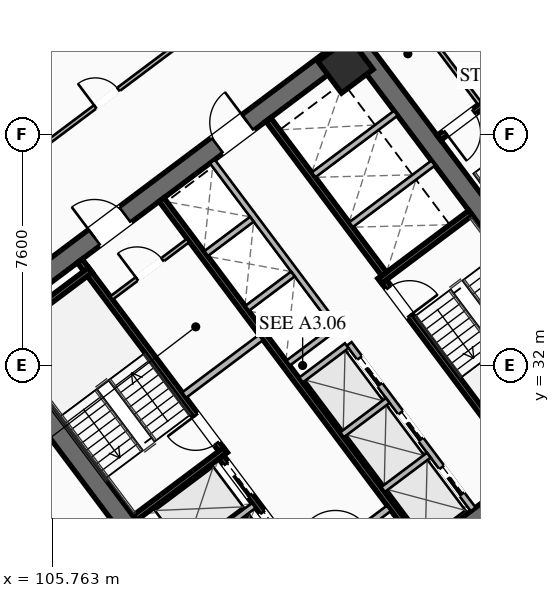
"""IFC4 building model, lengths in metres.
Left out: names, types, materials, properties, quantities, classifications, styles, units other than length and angle.
Written with IfcOpenShell. Run it as: python <this file> out.ifc"""

import sys

from ifc_helpers import new_model, si_unit, direction, frame, frame_2d, origin, origin_2d, place, context, subcontext, project, spatial, rectangle, hollow_rectangle, extrude, element, fill, save


model = new_model("IFC4")
c1 = context("Model", 3, precision=1e-05, world=origin(), true_north=direction((0.0, 1.0)))
c2 = subcontext(c1, "Body", "Model", "MODEL_VIEW")
j1 = project(units=[si_unit("LENGTHUNIT", "METRE"), si_unit("PLANEANGLEUNIT", "RADIAN")], contexts=[c1])
p1 = place(None, origin())
s1 = spatial("IfcSite", under=j1, at=p1, CompositionType="ELEMENT")
p2 = place(p1, origin())
s2 = spatial("IfcBuilding", under=s1, at=p2, CompositionType="ELEMENT")
p3 = place(p2, frame((0.0, 0.0, 35.25)))
s3 = spatial("IfcBuildingStorey", under=s2, at=p3, CompositionType="ELEMENT", Elevation=35.25)
for number, where, z_axis, x_axis in (
    (1, (112.476, 21.107, 0.0), (0.0, 0.0, 1.0), (-0.6, 0.8, 0.0)),
    (2, (115.524, 42.893, 0.0), (0.0, 0.0, 1.0), (0.6, -0.8, 0.0)),
):
    element("IfcWall", number, at=place(p3, frame(where, z_axis=z_axis, x_axis=x_axis)), inside=s3, PredefinedType="SHEAR", context=c2, shape_type="SweptSolid", body=[
        extrude(rectangle(XDim=15.6, YDim=0.65, at=frame_2d((7.8, 0.0))), origin(), (0.0, 0.0, 1.0), 3.55),
    ])
p4 = place(p3, frame((124.429, 30.478, 0.0), z_axis=(0.0, 0.0, 1.0), x_axis=(-0.799998028465, -0.600002628705, 0.0)))
e3 = element("IfcWall", 3, at=p4, inside=s3, PredefinedType="SHEAR", context=c2, shape_type="SweptSolid", body=[
    extrude(rectangle(XDim=14.86, YDim=0.65, at=frame_2d((7.43, 0.0))), origin(), (0.0, 0.0, 1.0), 3.55),
])
p5 = place(p4, frame((9.13, 0.0, 0.0)))
e4 = element("IfcOpeningElement", 4, at=p5, cuts=e3, PredefinedType="OPENING", context=c2, shape_type="SweptSolid", body=[
    extrude(rectangle(XDim=1.25, YDim=2.25, at=frame_2d((0.625, 1.125))), frame((0.0, 0.335, 0.0), z_axis=(0.0, -1.0, 0.0), x_axis=(1.0, 0.0, 0.0)), (0.0, 0.0, 1.0), 0.67),
])
p6 = place(p4, frame((4.08, 0.0, 0.0)))
e5 = element("IfcOpeningElement", 5, at=p6, cuts=e3, PredefinedType="OPENING", context=c2, shape_type="SweptSolid", body=[
    extrude(rectangle(XDim=1.25, YDim=2.25, at=frame_2d((0.625, 1.125))), frame((0.0, 0.335, 0.0), z_axis=(0.0, -1.0, 0.0), x_axis=(1.0, 0.0, 0.0)), (0.0, 0.0, 1.0), 0.67),
])
p7 = place(p3, frame((103.571, 33.522, 0.0), z_axis=(0.0, 0.0, 1.0), x_axis=(0.799998028465, 0.600002628705, 0.0)))
e6 = element("IfcWall", 6, at=p7, inside=s3, PredefinedType="SHEAR", context=c2, shape_type="SweptSolid", body=[
    extrude(rectangle(XDim=14.86, YDim=0.65, at=frame_2d((7.43, 0.0))), origin(), (0.0, 0.0, 1.0), 3.55),
])
p8 = place(p7, frame((4.48, 0.0, 0.0)))
e7 = element("IfcOpeningElement", 7, at=p8, cuts=e6, PredefinedType="OPENING", context=c2, shape_type="SweptSolid", body=[
    extrude(rectangle(XDim=1.25, YDim=2.25, at=frame_2d((0.625, 1.125))), frame((0.0, 0.335, 0.0), z_axis=(0.0, -1.0, 0.0), x_axis=(1.0, 0.0, 0.0)), (0.0, 0.0, 1.0), 0.67),
])
p9 = place(p7, frame((9.53, 0.0, 0.0)))
e8 = element("IfcOpeningElement", 8, at=p9, cuts=e6, PredefinedType="OPENING", context=c2, shape_type="SweptSolid", body=[
    extrude(rectangle(XDim=1.25, YDim=2.25, at=frame_2d((0.625, 1.125))), frame((0.0, 0.335, 0.0), z_axis=(0.0, -1.0, 0.0), x_axis=(1.0, 0.0, 0.0)), (0.0, 0.0, 1.0), 0.67),
])
p10 = place(p3, frame((115.41, 41.87, 0.0), z_axis=(0.0, 0.0, 1.0), x_axis=(0.799999996291, 0.600000004945, 0.0)))
e9 = element("IfcColumn", 9, at=p10, inside=s3, PredefinedType="COLUMN", context=c2, shape_type="SweptSolid", body=[
    extrude(hollow_rectangle(XDim=1.3, YDim=1.3, WallThickness=0.05, at=origin_2d()), origin(), (0.0, 0.0, 1.0), 3.35),
])
p11 = place(p3, frame((111.44, 29.08, 0.0), z_axis=(0.0, 0.0, 1.0), x_axis=(-0.600009827119, 0.799992629566, 0.0)))
e10 = element("IfcWall", 10, at=p11, inside=s3, PredefinedType="SHEAR", context=c2, shape_type="SweptSolid", body=[
    extrude(rectangle(XDim=7.95, YDim=0.2, at=frame_2d((3.975, 0.0))), origin(), (0.0, 0.0, 1.0), 3.35),
])
p12 = place(p11, frame((0.45, 0.0, 0.0)))
e11 = element("IfcOpeningElement", 11, at=p12, cuts=e10, PredefinedType="OPENING", context=c2, shape_type="SweptSolid", body=[
    extrude(rectangle(XDim=1.15, YDim=2.2, at=frame_2d((0.575, 1.1))), frame((0.0, 0.11, 0.0), z_axis=(0.0, -1.0, 0.0), x_axis=(1.0, 0.0, 0.0)), (0.0, 0.0, 1.0), 0.22),
])
for number, where, z_axis, x_axis in (
    (12, (108.476, 26.982, 0.0), (0.0, 0.0, 1.0), (0.8, 0.6, 0.0)),
    (13, (104.036, 32.902, 0.0), (0.0, 0.0, 1.0), (0.8, 0.6, 0.0)),
):
    element("IfcWall", number, at=place(p3, frame(where, z_axis=z_axis, x_axis=x_axis)), inside=s3, PredefinedType="SHEAR", context=c2, shape_type="SweptSolid", body=[
        extrude(rectangle(XDim=3.73, YDim=0.2, at=frame_2d((1.865, 0.0))), origin(), (0.0, 0.0, 1.0), 3.35),
    ])
p13 = place(p3, frame((116.56, 34.92, 0.0), z_axis=(0.0, 0.0, 1.0), x_axis=(0.600009827119, -0.799992629566, 0.0)))
e14 = element("IfcWall", 14, at=p13, inside=s3, PredefinedType="SHEAR", context=c2, shape_type="SweptSolid", body=[
    extrude(rectangle(XDim=7.95, YDim=0.2, at=frame_2d((3.975, 0.0))), origin(), (0.0, 0.0, 1.0), 3.35),
])
p14 = place(p13, frame((0.45, 0.0, 0.0)))
e15 = element("IfcOpeningElement", 15, at=p14, cuts=e14, PredefinedType="OPENING", context=c2, shape_type="SweptSolid", body=[
    extrude(rectangle(XDim=1.15, YDim=2.2, at=frame_2d((0.575, 1.1))), frame((0.0, 0.11, 0.0), z_axis=(0.0, -1.0, 0.0), x_axis=(1.0, 0.0, 0.0)), (0.0, 0.0, 1.0), 0.22),
])
p15 = place(p3, frame((116.54, 34.78, 0.0), z_axis=(0.0, 0.0, 1.0), x_axis=(0.799984290658, 0.600020945218, 0.0)))
e16 = element("IfcWall", 16, at=p15, inside=s3, PredefinedType="SHEAR", context=c2, shape_type="SweptSolid", body=[
    extrude(rectangle(XDim=3.73, YDim=0.2, at=frame_2d((1.865, 0.0))), origin(), (0.0, 0.0, 1.0), 3.35),
])
p16 = place(p3, frame((117.938, 26.016, 0.0), z_axis=(0.0, 0.0, 1.0), x_axis=(-0.600005463273, 0.799995902516, 0.0)))
e17 = element("IfcWall", 17, at=p16, inside=s3, PredefinedType="SHEAR", context=c2, shape_type="SweptSolid", body=[
    extrude(rectangle(XDim=14.3, YDim=0.2, at=frame_2d((7.15, 0.0))), origin(), (0.0, 0.0, 1.0), 3.35),
])
p17 = place(p3, frame((110.104, 31.028, 0.0), z_axis=(0.0, 0.0, 1.0), x_axis=(0.800018601094, 0.59997519774, 0.0)))
e18 = element("IfcWall", 18, at=p17, inside=s3, PredefinedType="SOLIDWALL", context=c2, shape_type="SweptSolid", body=[
    extrude(rectangle(XDim=3.15, YDim=0.22, at=frame_2d((1.575, 0.0))), origin(), (0.0, 0.0, 1.0), 2.703),
])
p18 = place(p3, frame((114.316, 25.412, 0.0), z_axis=(0.0, 0.0, 1.0), x_axis=(0.800018601094, 0.59997519774, 0.0)))
e19 = element("IfcWall", 19, at=p18, inside=s3, PredefinedType="SOLIDWALL", context=c2, shape_type="SweptSolid", body=[
    extrude(rectangle(XDim=3.15, YDim=0.22, at=frame_2d((1.575, 0.0))), origin(), (0.0, 0.0, 1.0), 2.703),
])
p19 = place(p18, frame((0.95, 0.0, 0.0)))
e20 = element("IfcOpeningElement", 20, at=p19, cuts=e19, PredefinedType="OPENING", context=c2, shape_type="SweptSolid", body=[
    extrude(rectangle(XDim=1.25, YDim=2.25, at=frame_2d((0.625, 1.125))), frame((0.0, 0.12, 0.0), z_axis=(0.0, -1.0, 0.0), x_axis=(1.0, 0.0, 0.0)), (0.0, 0.0, 1.0), 0.24),
])
p20 = place(p3, frame((115.13, 23.91, 0.0), z_axis=(0.0, 0.0, 1.0), x_axis=(-0.599975393228, 0.800018454488, 0.0)))
e21 = element("IfcWall", 21, at=p20, inside=s3, PredefinedType="SHEAR", context=c2, shape_type="SweptSolid", body=[
    extrude(rectangle(XDim=6.35, YDim=0.2, at=frame_2d((3.175, 0.0))), origin(), (0.0, 0.0, 1.0), 3.35),
])
p21 = place(p20, frame((4.775, 0.0, 0.0)))
e22 = element("IfcOpeningElement", 22, at=p21, cuts=e21, PredefinedType="OPENING", context=c2, shape_type="SweptSolid", body=[
    extrude(rectangle(XDim=1.3, YDim=2.25, at=frame_2d((0.65, 1.125))), frame((0.0, 0.11, 0.0), z_axis=(0.0, -1.0, 0.0), x_axis=(1.0, 0.0, 0.0)), (0.0, 0.0, 1.0), 0.22),
])
p22 = place(p20, frame((2.775, 0.0, 0.0)))
e23 = element("IfcOpeningElement", 23, at=p22, cuts=e21, PredefinedType="OPENING", context=c2, shape_type="SweptSolid", body=[
    extrude(rectangle(XDim=1.3, YDim=2.25, at=frame_2d((0.65, 1.125))), frame((0.0, 0.11, 0.0), z_axis=(0.0, -1.0, 0.0), x_axis=(1.0, 0.0, 0.0)), (0.0, 0.0, 1.0), 0.22),
])
p23 = place(p20, frame((0.575, 0.0, 0.0)))
e24 = element("IfcOpeningElement", 24, at=p23, cuts=e21, PredefinedType="OPENING", context=c2, shape_type="SweptSolid", body=[
    extrude(rectangle(XDim=1.3, YDim=2.25, at=frame_2d((0.65, 1.125))), frame((0.0, 0.11, 0.0), z_axis=(0.0, -1.0, 0.0), x_axis=(1.0, 0.0, 0.0)), (0.0, 0.0, 1.0), 0.22),
])
p24 = place(p3, frame((109.688, 25.366, 0.0), z_axis=(0.0, 0.0, 1.0), x_axis=(0.8, 0.6, 0.0)))
e25 = element("IfcWall", 25, at=p24, inside=s3, PredefinedType="SOLIDWALL", context=c2, shape_type="SweptSolid", body=[
    extrude(rectangle(XDim=3.38, YDim=0.2, at=frame_2d((1.69, 0.0))), origin(), (0.0, 0.0, 1.0), 3.35),
])
p25 = place(p3, frame((112.87, 40.09, 0.0), z_axis=(0.0, 0.0, 1.0), x_axis=(0.599975393228, -0.800018454488, 0.0)))
e26 = element("IfcWall", 26, at=p25, inside=s3, PredefinedType="SHEAR", context=c2, shape_type="SweptSolid", body=[
    extrude(rectangle(XDim=6.35, YDim=0.2, at=frame_2d((3.175, 0.0))), origin(), (0.0, 0.0, 1.0), 3.35),
])
for number, where, z_axis, x_axis in (
    (27, (115.59, 36.63, 0.0), (0.0, 0.0, 1.0), (0.8, 0.6, 0.0)),
    (28, (114.36, 38.27, 0.0), (0.0, 0.0, 1.0), (0.8, 0.6, 0.0)),
):
    element("IfcWall", number, at=place(p3, frame(where, z_axis=z_axis, x_axis=x_axis)), inside=s3, PredefinedType="SOLIDWALL", context=c2, shape_type="SweptSolid", body=[
        extrude(rectangle(XDim=3.38, YDim=0.2, at=frame_2d((1.69, 0.0))), origin(), (0.0, 0.0, 1.0), 3.35),
    ])
p26 = place(p3, frame((107.71, 34.22, 0.0), z_axis=(0.0, 0.0, 1.0), x_axis=(0.799981399002, 0.60002480053, 0.0)))
e29 = element("IfcWall", 29, at=p26, inside=s3, PredefinedType="PARTITIONING", context=c2, shape_type="SweptSolid", body=[
    extrude(rectangle(XDim=3.15, YDim=0.135, at=frame_2d((1.575, 0.0))), origin(), (0.0, 0.0, 1.0), 2.703),
])
p27 = place(p26, frame((1.05, 0.0, 0.0)))
e30 = element("IfcOpeningElement", 30, at=p27, cuts=e29, PredefinedType="OPENING", context=c2, shape_type="SweptSolid", body=[
    extrude(rectangle(XDim=1.05, YDim=2.2, at=frame_2d((0.525, 1.1))), frame((0.0, 0.077, 0.0), z_axis=(0.0, -1.0, 0.0), x_axis=(1.0, 0.0, 0.0)), (0.0, 0.0, 1.0), 0.155),
])
p28 = place(p3, frame((119.61, 27.27, 0.0), z_axis=(0.0, 0.0, 1.0), x_axis=(-0.600011488909, 0.79999138319, 0.0)))
e31 = element("IfcWall", 31, at=p28, inside=s3, PredefinedType="SOLIDWALL", context=c2, shape_type="SweptSolid", body=[
    extrude(rectangle(XDim=6.8, YDim=0.2, at=frame_2d((3.4, 0.0))), origin(), (0.0, 0.0, 1.0), 3.35),
])
p29 = place(p28, frame((0.625, 0.0, 0.0)))
e32 = element("IfcOpeningElement", 32, at=p29, cuts=e31, PredefinedType="OPENING", context=c2, shape_type="SweptSolid", body=[
    extrude(rectangle(XDim=1.1, YDim=2.2, at=frame_2d((0.55, 1.1))), frame((0.0, 0.11, 0.0), z_axis=(0.0, -1.0, 0.0), x_axis=(1.0, 0.0, 0.0)), (0.0, 0.0, 1.0), 0.22),
])
p30 = place(p28, frame((2.875, 0.0, 0.0)))
e33 = element("IfcOpeningElement", 33, at=p30, cuts=e31, PredefinedType="OPENING", context=c2, shape_type="SweptSolid", body=[
    extrude(rectangle(XDim=1.1, YDim=2.2, at=frame_2d((0.55, 1.1))), frame((0.0, 0.11, 0.0), z_axis=(0.0, -1.0, 0.0), x_axis=(1.0, 0.0, 0.0)), (0.0, 0.0, 1.0), 0.22),
])
p31 = place(p28, frame((5.125, 0.0, 0.0)))
e34 = element("IfcOpeningElement", 34, at=p31, cuts=e31, PredefinedType="OPENING", context=c2, shape_type="SweptSolid", body=[
    extrude(rectangle(XDim=1.1, YDim=2.2, at=frame_2d((0.55, 1.1))), frame((0.0, 0.11, 0.0), z_axis=(0.0, -1.0, 0.0), x_axis=(1.0, 0.0, 0.0)), (0.0, 0.0, 1.0), 0.22),
])
p32 = place(p3, frame((116.646, 27.922, 0.0), z_axis=(0.0, 0.0, 1.0), x_axis=(0.8, 0.6, 0.0)))
e35 = element("IfcWall", 35, at=p32, inside=s3, PredefinedType="SOLIDWALL", context=c2, shape_type="SweptSolid", body=[
    extrude(rectangle(XDim=1.88, YDim=0.2, at=frame_2d((0.94, 0.0))), origin(), (0.0, 0.0, 1.0), 3.35),
])
p33 = place(p3, frame((115.296, 29.722, 0.0), z_axis=(0.0, 0.0, 1.0), x_axis=(0.799984418148, 0.600020775241, 0.0)))
e36 = element("IfcWall", 36, at=p33, inside=s3, PredefinedType="SOLIDWALL", context=c2, shape_type="SweptSolid", body=[
    extrude(rectangle(XDim=1.88, YDim=0.2, at=frame_2d((0.94, 0.0))), origin(), (0.0, 0.0, 1.0), 3.35),
])
p34 = place(p3, frame((113.946, 31.522, 0.0), z_axis=(0.0, 0.0, 1.0), x_axis=(0.8, 0.6, 0.0)))
e37 = element("IfcWall", 37, at=p34, inside=s3, PredefinedType="SOLIDWALL", context=c2, shape_type="SweptSolid", body=[
    extrude(rectangle(XDim=1.88, YDim=0.2, at=frame_2d((0.94, 0.0))), origin(), (0.0, 0.0, 1.0), 3.35),
])
p35 = place(p3, frame((115.11, 33.27, 0.0), z_axis=(0.0, 0.0, 1.0), x_axis=(-0.600011488909, 0.79999138319, 0.0)))
e38 = element("IfcWall", 38, at=p35, inside=s3, PredefinedType="SOLIDWALL", context=c2, shape_type="SweptSolid", body=[
    extrude(rectangle(XDim=6.8, YDim=0.2, at=frame_2d((3.4, 0.0))), origin(), (0.0, 0.0, 1.0), 3.35),
])
p36 = place(p3, frame((113.526, 32.082, 0.0), z_axis=(0.0, 0.0, 1.0), x_axis=(0.800046745961, 0.599937666993, 0.0)))
e39 = element("IfcWall", 39, at=p36, inside=s3, PredefinedType="SOLIDWALL", context=c2, shape_type="SweptSolid", body=[
    extrude(rectangle(XDim=1.88, YDim=0.2, at=frame_2d((0.94, 0.0))), origin(), (0.0, 0.0, 1.0), 3.35),
])
p37 = place(p3, frame((112.176, 33.882, 0.0), z_axis=(0.0, 0.0, 1.0), x_axis=(0.8, 0.6, 0.0)))
e40 = element("IfcWall", 40, at=p37, inside=s3, PredefinedType="SOLIDWALL", context=c2, shape_type="SweptSolid", body=[
    extrude(rectangle(XDim=1.88, YDim=0.2, at=frame_2d((0.94, 0.0))), origin(), (0.0, 0.0, 1.0), 3.35),
])
p38 = place(p3, frame((110.826, 35.682, 0.0), z_axis=(0.0, 0.0, 1.0), x_axis=(0.799984418148, 0.600020775241, 0.0)))
e41 = element("IfcWall", 41, at=p38, inside=s3, PredefinedType="SOLIDWALL", context=c2, shape_type="SweptSolid", body=[
    extrude(rectangle(XDim=1.88, YDim=0.2, at=frame_2d((0.94, 0.0))), origin(), (0.0, 0.0, 1.0), 3.35),
])
p39 = place(p3, frame((121.204, 41.528, 0.0), z_axis=(0.0, 0.0, 1.0), x_axis=(-0.800017232136, -0.599977023131, 0.0)))
e42 = element("IfcWall", 42, at=p39, inside=s3, PredefinedType="SHEAR", context=c2, shape_type="SweptSolid", body=[
    extrude(rectangle(XDim=3.4, YDim=0.2, at=frame_2d((1.7, 0.0))), origin(), (0.0, 0.0, 1.0), 3.35),
])
p40 = place(p39, frame((1.975, 0.0, 0.0)))
e43 = element("IfcOpeningElement", 43, at=p40, cuts=e42, PredefinedType="OPENING", context=c2, shape_type="SweptSolid", body=[
    extrude(rectangle(XDim=1.15, YDim=2.2, at=frame_2d((0.575, 1.1))), frame((0.0, 0.11, 0.0), z_axis=(0.0, -1.0, 0.0), x_axis=(1.0, 0.0, 0.0)), (0.0, 0.0, 1.0), 0.22),
])
p41 = place(p3, frame((119.824, 40.618, 0.0), z_axis=(0.0, 0.0, 1.0), x_axis=(-0.599982243973, 0.800013316712, 0.0)))
e44 = element("IfcWall", 44, at=p41, inside=s3, PredefinedType="PARTITIONING", context=c2, shape_type="SweptSolid", body=[
    extrude(rectangle(XDim=4.4, YDim=0.135, at=frame_2d((2.2, 0.0))), origin(), (0.0, 0.0, 1.0), 2.703),
])
p42 = place(p3, frame((98.516, 34.012, 0.0), z_axis=(0.0, 0.0, 1.0), x_axis=(0.799998035726, 0.600002619023, 0.0)))
e45 = element("IfcWall", 45, at=p42, inside=s3, PredefinedType="PARTITIONING", context=c2, shape_type="SweptSolid", body=[
    extrude(rectangle(XDim=29.83, YDim=0.135, at=frame_2d((14.915, 0.0))), origin(), (0.0, 0.0, 1.0), 2.703),
])
p43 = place(p42, frame((0.3, 0.0, 0.0)))
e46 = element("IfcOpeningElement", 46, at=p43, cuts=e45, PredefinedType="OPENING", context=c2, shape_type="SweptSolid", body=[
    extrude(rectangle(XDim=0.95, YDim=2.05, at=frame_2d((0.475, 1.025))), frame((0.0, 0.077, 0.0), z_axis=(0.0, -1.0, 0.0), x_axis=(1.0, 0.0, 0.0)), (0.0, 0.0, 1.0), 0.155),
])
p44 = place(p42, frame((10.829, 0.0, 0.0)))
e47 = element("IfcOpeningElement", 47, at=p44, cuts=e45, PredefinedType="OPENING", context=c2, shape_type="SweptSolid", body=[
    extrude(rectangle(XDim=0.95, YDim=2.05, at=frame_2d((0.475, 1.025))), frame((0.0, 0.077, 0.0), z_axis=(0.0, -1.0, 0.0), x_axis=(1.0, 0.0, 0.0)), (0.0, 0.0, 1.0), 0.155),
])
p45 = place(p42, frame((28.58, 0.0, 0.0)))
e48 = element("IfcOpeningElement", 48, at=p45, cuts=e45, PredefinedType="OPENING", context=c2, shape_type="SweptSolid", body=[
    extrude(rectangle(XDim=0.95, YDim=2.05, at=frame_2d((0.475, 1.025))), frame((0.0, 0.077, 0.0), z_axis=(0.0, -1.0, 0.0), x_axis=(1.0, 0.0, 0.0)), (0.0, 0.0, 1.0), 0.155),
])
p46 = place(p3, frame((135.67, 34.19, 0.0), z_axis=(0.0, 0.0, 1.0), x_axis=(-0.800000982127, -0.599998690494, 0.0)))
e49 = element("IfcWall", 49, at=p46, inside=s3, PredefinedType="PARTITIONING", context=c2, shape_type="SweptSolid", body=[
    extrude(rectangle(XDim=29.83, YDim=0.135, at=frame_2d((14.915, 0.0))), origin(), (0.0, 0.0, 1.0), 2.703),
])
p47 = place(p46, frame((28.5, 0.0, 0.0)))
e50 = element("IfcOpeningElement", 50, at=p47, cuts=e49, PredefinedType="OPENING", context=c2, shape_type="SweptSolid", body=[
    extrude(rectangle(XDim=0.95, YDim=2.05, at=frame_2d((0.475, 1.025))), frame((0.0, 0.077, 0.0), z_axis=(0.0, -1.0, 0.0), x_axis=(1.0, 0.0, 0.0)), (0.0, 0.0, 1.0), 0.155),
])
p48 = place(p46, frame((18.075, 0.0, 0.0)))
e51 = element("IfcOpeningElement", 51, at=p48, cuts=e49, PredefinedType="OPENING", context=c2, shape_type="SweptSolid", body=[
    extrude(rectangle(XDim=0.95, YDim=2.05, at=frame_2d((0.475, 1.025))), frame((0.0, 0.077, 0.0), z_axis=(0.0, -1.0, 0.0), x_axis=(1.0, 0.0, 0.0)), (0.0, 0.0, 1.0), 0.155),
])
p49 = place(p46, frame((0.38, 0.0, 0.0)))
e52 = element("IfcOpeningElement", 52, at=p49, cuts=e49, PredefinedType="OPENING", context=c2, shape_type="SweptSolid", body=[
    extrude(rectangle(XDim=0.95, YDim=2.05, at=frame_2d((0.475, 1.025))), frame((0.0, 0.077, 0.0), z_axis=(0.0, -1.0, 0.0), x_axis=(1.0, 0.0, 0.0)), (0.0, 0.0, 1.0), 0.155),
])
p50 = place(p3, frame((111.758, 16.356, 0.0), z_axis=(0.0, 0.0, 1.0), x_axis=(-0.600001776367, 0.799998667722, 0.0)))
e53 = element("IfcWall", 53, at=p50, inside=s3, PredefinedType="PARTITIONING", context=c2, shape_type="SweptSolid", body=[
    extrude(rectangle(XDim=21.99, YDim=0.135, at=frame_2d((10.995, 0.0))), origin(), (0.0, 0.0, 1.0), 2.703),
])
p51 = place(p50, frame((0.3, 0.0, 0.0)))
e54 = element("IfcOpeningElement", 54, at=p51, cuts=e53, PredefinedType="OPENING", context=c2, shape_type="SweptSolid", body=[
    extrude(rectangle(XDim=0.95, YDim=2.05, at=frame_2d((0.475, 1.025))), frame((0.0, 0.077, 0.0), z_axis=(0.0, -1.0, 0.0), x_axis=(1.0, 0.0, 0.0)), (0.0, 0.0, 1.0), 0.155),
])
p52 = place(p50, frame((10.952, 0.0, 0.0)))
e55 = element("IfcOpeningElement", 55, at=p52, cuts=e53, PredefinedType="OPENING", context=c2, shape_type="SweptSolid", body=[
    extrude(rectangle(XDim=0.95, YDim=2.05, at=frame_2d((0.475, 1.025))), frame((0.0, 0.077, 0.0), z_axis=(0.0, -1.0, 0.0), x_axis=(1.0, 0.0, 0.0)), (0.0, 0.0, 1.0), 0.155),
])
p53 = place(p50, frame((20.74, 0.0, 0.0)))
e56 = element("IfcOpeningElement", 56, at=p53, cuts=e53, PredefinedType="OPENING", context=c2, shape_type="SweptSolid", body=[
    extrude(rectangle(XDim=0.95, YDim=2.05, at=frame_2d((0.475, 1.025))), frame((0.0, 0.077, 0.0), z_axis=(0.0, -1.0, 0.0), x_axis=(1.0, 0.0, 0.0)), (0.0, 0.0, 1.0), 0.155),
])
p54 = place(p8, origin())
e57 = element("IfcDoor", 57, at=p54, inside=s3, OperationType="SINGLE_SWING_LEFT", PredefinedType="DOOR", context=c2, shape_type="SweptSolid", body=[
    extrude(rectangle(XDim=1.25, YDim=2.25, at=frame_2d((0.625, 1.125))), frame((0.0, 0.025, 0.0), z_axis=(0.0, -1.0, 0.0), x_axis=(1.0, 0.0, 0.0)), (0.0, 0.0, 1.0), 0.05),
])
fill(e7, e57)
p55 = place(p9, origin())
e58 = element("IfcDoor", 58, at=p55, inside=s3, OperationType="SINGLE_SWING_RIGHT", PredefinedType="DOOR", context=c2, shape_type="SweptSolid", body=[
    extrude(rectangle(XDim=1.25, YDim=2.25, at=frame_2d((0.625, 1.125))), frame((0.0, 0.025, 0.0), z_axis=(0.0, -1.0, 0.0), x_axis=(1.0, 0.0, 0.0)), (0.0, 0.0, 1.0), 0.05),
])
fill(e8, e58)
p56 = place(p12, origin())
e59 = element("IfcDoor", 59, at=p56, inside=s3, OperationType="SINGLE_SWING_RIGHT", PredefinedType="DOOR", context=c2, shape_type="SweptSolid", body=[
    extrude(rectangle(XDim=1.15, YDim=2.2, at=frame_2d((0.575, 1.1))), frame((0.0, 0.025, 0.0), z_axis=(0.0, -1.0, 0.0), x_axis=(1.0, 0.0, 0.0)), (0.0, 0.0, 1.0), 0.05),
])
fill(e11, e59)
p57 = place(p14, origin())
e60 = element("IfcDoor", 60, at=p57, inside=s3, OperationType="SINGLE_SWING_RIGHT", PredefinedType="DOOR", context=c2, shape_type="SweptSolid", body=[
    extrude(rectangle(XDim=1.15, YDim=2.2, at=frame_2d((0.575, 1.1))), frame((0.0, 0.025, 0.0), z_axis=(0.0, -1.0, 0.0), x_axis=(1.0, 0.0, 0.0)), (0.0, 0.0, 1.0), 0.05),
])
fill(e15, e60)
p58 = place(p27, origin())
e61 = element("IfcDoor", 61, at=p58, inside=s3, OperationType="SINGLE_SWING_LEFT", PredefinedType="DOOR", context=c2, shape_type="SweptSolid", body=[
    extrude(rectangle(XDim=1.05, YDim=2.2, at=frame_2d((0.525, 1.1))), frame((0.0, 0.025, 0.0), z_axis=(0.0, -1.0, 0.0), x_axis=(1.0, 0.0, 0.0)), (0.0, 0.0, 1.0), 0.05),
])
fill(e30, e61)
p59 = place(p40, origin())
e62 = element("IfcDoor", 62, at=p59, inside=s3, OperationType="SINGLE_SWING_RIGHT", PredefinedType="DOOR", context=c2, shape_type="SweptSolid", body=[
    extrude(rectangle(XDim=1.15, YDim=2.2, at=frame_2d((0.575, 1.1))), frame((0.0, 0.025, 0.0), z_axis=(0.0, -1.0, 0.0), x_axis=(1.0, 0.0, 0.0)), (0.0, 0.0, 1.0), 0.05),
])
fill(e43, e62)
p60 = place(p44, origin())
e63 = element("IfcDoor", 63, at=p60, inside=s3, OperationType="SINGLE_SWING_LEFT", PredefinedType="DOOR", context=c2, shape_type="SweptSolid", body=[
    extrude(rectangle(XDim=0.95, YDim=2.05, at=frame_2d((0.475, 1.025))), frame((0.0, 0.025, 0.0), z_axis=(0.0, -1.0, 0.0), x_axis=(1.0, 0.0, 0.0)), (0.0, 0.0, 1.0), 0.05),
])
fill(e47, e63)
p61 = place(p21, origin())
e64 = element("IfcDoor", 64, at=p61, inside=s3, OperationType="SLIDING_TO_LEFT", PredefinedType="DOOR", context=c2, shape_type="SweptSolid", body=[
    extrude(rectangle(XDim=1.3, YDim=2.25, at=frame_2d((0.65, 1.125))), frame((0.0, 0.025, 0.0), z_axis=(0.0, -1.0, 0.0), x_axis=(1.0, 0.0, 0.0)), (0.0, 0.0, 1.0), 0.05),
])
fill(e22, e64)
p62 = place(p22, origin())
e65 = element("IfcDoor", 65, at=p62, inside=s3, OperationType="SLIDING_TO_LEFT", PredefinedType="DOOR", context=c2, shape_type="SweptSolid", body=[
    extrude(rectangle(XDim=1.3, YDim=2.25, at=frame_2d((0.65, 1.125))), frame((0.0, 0.025, 0.0), z_axis=(0.0, -1.0, 0.0), x_axis=(1.0, 0.0, 0.0)), (0.0, 0.0, 1.0), 0.05),
])
fill(e23, e65)
p63 = place(p29, origin())
e66 = element("IfcDoor", 66, at=p63, inside=s3, OperationType="SLIDING_TO_LEFT", PredefinedType="DOOR", context=c2, shape_type="SweptSolid", body=[
    extrude(rectangle(XDim=1.1, YDim=2.2, at=frame_2d((0.55, 1.1))), frame((0.0, 0.025, 0.0), z_axis=(0.0, -1.0, 0.0), x_axis=(1.0, 0.0, 0.0)), (0.0, 0.0, 1.0), 0.05),
])
fill(e32, e66)
p64 = place(p30, origin())
e67 = element("IfcDoor", 67, at=p64, inside=s3, OperationType="SLIDING_TO_LEFT", PredefinedType="DOOR", context=c2, shape_type="SweptSolid", body=[
    extrude(rectangle(XDim=1.1, YDim=2.2, at=frame_2d((0.55, 1.1))), frame((0.0, 0.025, 0.0), z_axis=(0.0, -1.0, 0.0), x_axis=(1.0, 0.0, 0.0)), (0.0, 0.0, 1.0), 0.05),
])
fill(e33, e67)
p65 = place(p31, origin())
e68 = element("IfcDoor", 68, at=p65, inside=s3, OperationType="SLIDING_TO_LEFT", PredefinedType="DOOR", context=c2, shape_type="SweptSolid", body=[
    extrude(rectangle(XDim=1.1, YDim=2.2, at=frame_2d((0.55, 1.1))), frame((0.0, 0.025, 0.0), z_axis=(0.0, -1.0, 0.0), x_axis=(1.0, 0.0, 0.0)), (0.0, 0.0, 1.0), 0.05),
])
fill(e34, e68)
save(model, sys.argv[1])
